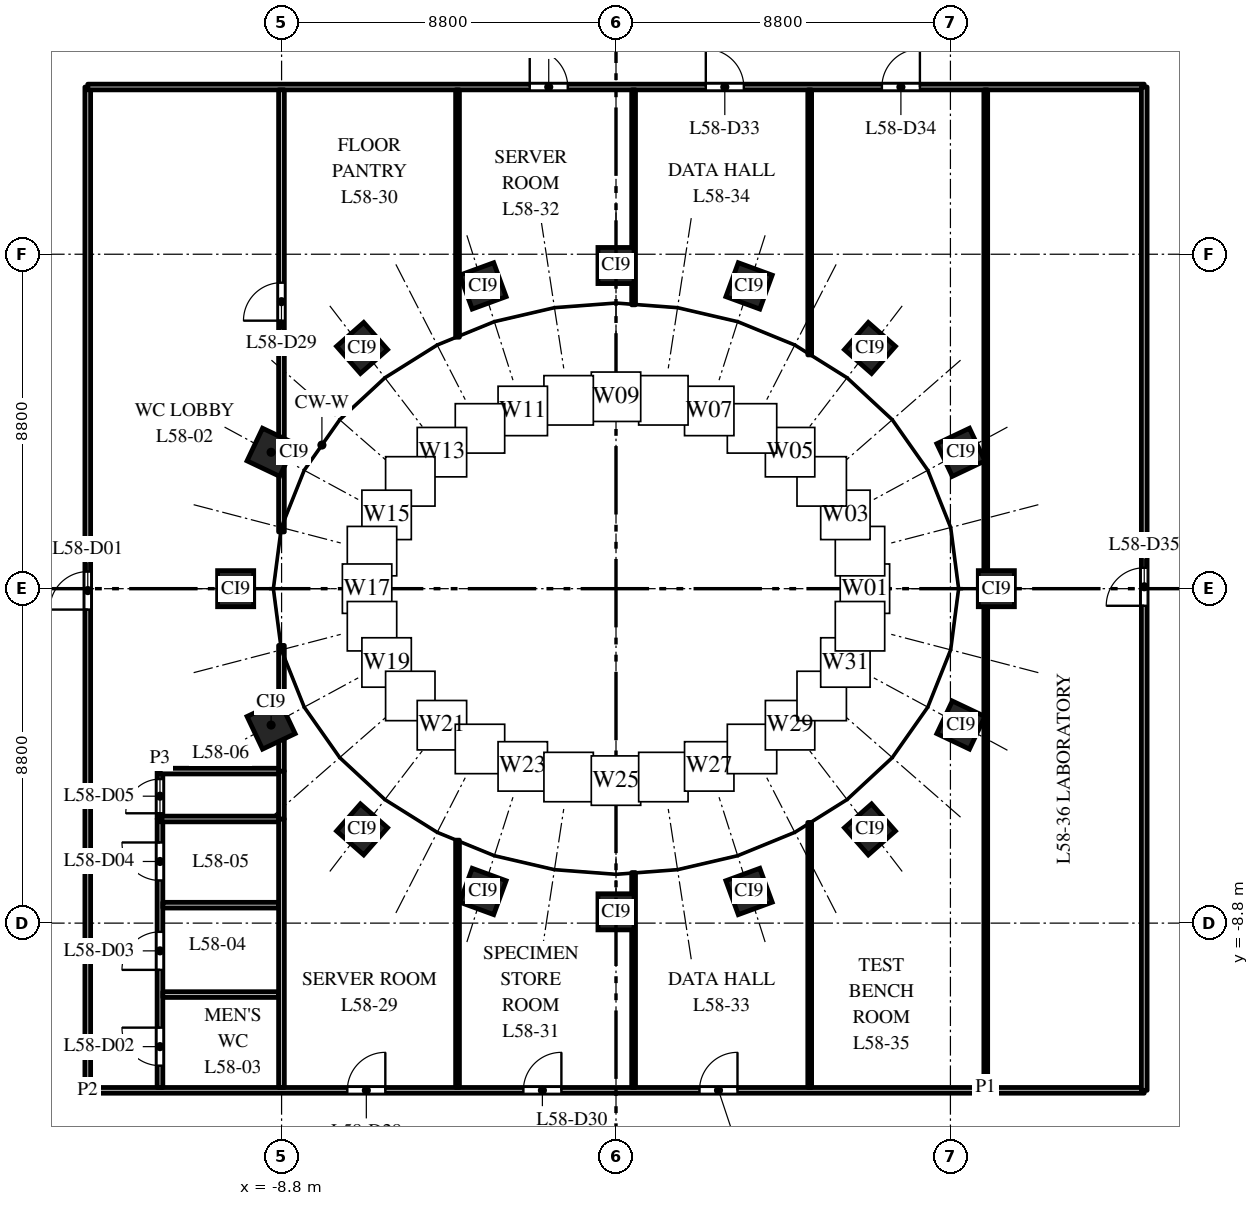
"""IFC4 building model, lengths in metres.
Left out: names, types, materials, properties, quantities, classifications, styles, units other than length and angle.
Written with IfcOpenShell. Run it as: python <this file> out.ifc"""

import sys

from ifc_helpers import new_model, si_unit, direction, frame, frame_2d, origin, origin_2d, place, context, subcontext, project, spatial, rectangle, extrude, element, fill, save


model = new_model("IFC4")
c1 = context("Model", 3, precision=1e-05, world=origin(), true_north=direction((0.0, 1.0)))
c2 = subcontext(c1, "Body", "Model", "MODEL_VIEW")
j1 = project(units=[si_unit("LENGTHUNIT", "METRE"), si_unit("PLANEANGLEUNIT", "RADIAN")], contexts=[c1])
p1 = place(None, origin())
s1 = spatial("IfcSite", under=j1, at=p1, CompositionType="ELEMENT")
p2 = place(p1, origin())
s2 = spatial("IfcBuilding", under=s1, at=p2, CompositionType="ELEMENT")
p3 = place(p2, frame((0.0, 0.0, 273.5)))
s3 = spatial("IfcBuildingStorey", under=s2, at=p3, CompositionType="ELEMENT", Elevation=273.5)
for number, where, z_axis, x_axis in (
    (1, (10.008, 0.0, 0.0), (0.0, 0.0, 1.0), (0.0, 1.0, 0.0)),
    (2, (9.076, 3.588, 0.0), (0.0, 0.0, 1.0), (-0.429, 0.903, 0.0)),
    (3, (6.682, 6.334, 0.0), (0.0, 0.0, 1.0), (-0.751, 0.66, 0.0)),
    (4, (3.501, 7.967, 0.0), (0.0, 0.0, 1.0), (-0.939, 0.344, 0.0)),
    (5, (0.0, 8.503, 0.0), (0.0, 0.0, 1.0), (-1.0, 0.0, 0.0)),
    (6, (-3.501, 7.967, 0.0), (0.0, 0.0, 1.0), (-0.939, -0.344, 0.0)),
    (7, (-6.682, 6.334, 0.0), (0.0, 0.0, 1.0), (-0.751, -0.66, 0.0)),
    (8, (-9.076, 3.588, 0.0), (0.0, 0.0, 1.0), (-0.429, -0.903, 0.0)),
    (9, (-10.008, 0.0, 0.0), (0.0, 0.0, 1.0), (0.0, -1.0, 0.0)),
    (10, (-9.076, -3.588, 0.0), (0.0, 0.0, 1.0), (0.429, -0.903, 0.0)),
    (11, (-6.682, -6.334, 0.0), (0.0, 0.0, 1.0), (0.751, -0.66, 0.0)),
    (12, (-3.501, -7.967, 0.0), (0.0, 0.0, 1.0), (0.939, -0.344, 0.0)),
    (13, (0.0, -8.503, 0.0), (0.0, 0.0, 1.0), (1.0, 0.0, 0.0)),
    (14, (3.501, -7.967, 0.0), (0.0, 0.0, 1.0), (0.939, 0.344, 0.0)),
    (15, (6.682, -6.334, 0.0), (0.0, 0.0, 1.0), (0.751, 0.66, 0.0)),
    (16, (9.076, -3.588, 0.0), (0.0, 0.0, 1.0), (0.429, 0.903, 0.0)),
):
    element("IfcColumn", number, at=place(p3, frame(where, z_axis=z_axis, x_axis=x_axis)), inside=s3, PredefinedType="COLUMN", context=c2, shape_type="SweptSolid", body=[
        extrude(rectangle(XDim=0.95, YDim=0.95, at=origin_2d()), origin(), (0.0, 0.0, 1.0), 4.0),
    ])
p4 = place(p3, frame((-13.9, -13.2, 0.0), z_axis=(0.0, 0.0, 1.0), x_axis=(0.0, 1.0, 0.0)))
e17 = element("IfcWall", 17, at=p4, inside=s3, PredefinedType="PARTITIONING", context=c2, shape_type="SweptSolid", body=[
    extrude(rectangle(XDim=26.4, YDim=0.15, at=frame_2d((13.2, 0.0))), origin(), (0.0, 0.0, 1.0), 2.75),
])
p5 = place(p4, frame((12.65, 0.0, 0.0)))
e18 = element("IfcOpeningElement", 18, at=p5, cuts=e17, PredefinedType="OPENING", context=c2, shape_type="SweptSolid", body=[
    extrude(rectangle(XDim=1.0, YDim=2.1, at=frame_2d((0.5, 1.05))), frame((0.0, 0.085, 0.0), z_axis=(0.0, -1.0, 0.0), x_axis=(1.0, 0.0, 0.0)), (0.0, 0.0, 1.0), 0.17),
])
p6 = place(p3, frame((-13.9, -13.2, 0.0), z_axis=(0.0, 0.0, 1.0), x_axis=(1.0, 0.0, 0.0)))
e19 = element("IfcWall", 19, at=p6, inside=s3, PredefinedType="PARTITIONING", context=c2, shape_type="SweptSolid", body=[
    extrude(rectangle(XDim=27.8, YDim=0.15, at=frame_2d((13.9, 0.0))), origin(), (0.0, 0.0, 1.0), 2.85),
])
p7 = place(p6, frame((6.83, 0.0, 0.0)))
e20 = element("IfcOpeningElement", 20, at=p7, cuts=e19, PredefinedType="OPENING", context=c2, shape_type="SweptSolid", body=[
    extrude(rectangle(XDim=1.0, YDim=2.1, at=frame_2d((0.5, 1.05))), frame((0.0, 0.085, 0.0), z_axis=(0.0, -1.0, 0.0), x_axis=(1.0, 0.0, 0.0)), (0.0, 0.0, 1.0), 0.17),
])
p8 = place(p6, frame((11.463, 0.0, 0.0)))
e21 = element("IfcOpeningElement", 21, at=p8, cuts=e19, PredefinedType="OPENING", context=c2, shape_type="SweptSolid", body=[
    extrude(rectangle(XDim=1.0, YDim=2.1, at=frame_2d((0.5, 1.05))), frame((0.0, 0.085, 0.0), z_axis=(0.0, -1.0, 0.0), x_axis=(1.0, 0.0, 0.0)), (0.0, 0.0, 1.0), 0.17),
])
p9 = place(p6, frame((16.097, 0.0, 0.0)))
e22 = element("IfcOpeningElement", 22, at=p9, cuts=e19, PredefinedType="OPENING", context=c2, shape_type="SweptSolid", body=[
    extrude(rectangle(XDim=1.0, YDim=2.1, at=frame_2d((0.5, 1.05))), frame((0.0, 0.085, 0.0), z_axis=(0.0, -1.0, 0.0), x_axis=(1.0, 0.0, 0.0)), (0.0, 0.0, 1.0), 0.17),
])
p10 = place(p3, frame((-13.9, 13.2, 0.0), z_axis=(0.0, 0.0, 1.0), x_axis=(1.0, 0.0, 0.0)))
e23 = element("IfcWall", 23, at=p10, inside=s3, PredefinedType="PARTITIONING", context=c2, shape_type="SweptSolid", body=[
    extrude(rectangle(XDim=27.8, YDim=0.15, at=frame_2d((13.9, 0.0))), origin(), (0.0, 0.0, 1.0), 2.85),
])
p11 = place(p10, frame((11.63, 0.0, 0.0)))
e24 = element("IfcOpeningElement", 24, at=p11, cuts=e23, PredefinedType="OPENING", context=c2, shape_type="SweptSolid", body=[
    extrude(rectangle(XDim=1.0, YDim=2.1, at=frame_2d((0.5, 1.05))), frame((0.0, 0.085, 0.0), z_axis=(0.0, -1.0, 0.0), x_axis=(1.0, 0.0, 0.0)), (0.0, 0.0, 1.0), 0.17),
])
p12 = place(p10, frame((16.263, 0.0, 0.0)))
e25 = element("IfcOpeningElement", 25, at=p12, cuts=e23, PredefinedType="OPENING", context=c2, shape_type="SweptSolid", body=[
    extrude(rectangle(XDim=1.0, YDim=2.1, at=frame_2d((0.5, 1.05))), frame((0.0, 0.085, 0.0), z_axis=(0.0, -1.0, 0.0), x_axis=(1.0, 0.0, 0.0)), (0.0, 0.0, 1.0), 0.17),
])
p13 = place(p10, frame((20.897, 0.0, 0.0)))
e26 = element("IfcOpeningElement", 26, at=p13, cuts=e23, PredefinedType="OPENING", context=c2, shape_type="SweptSolid", body=[
    extrude(rectangle(XDim=1.0, YDim=2.1, at=frame_2d((0.5, 1.05))), frame((0.0, 0.085, 0.0), z_axis=(0.0, -1.0, 0.0), x_axis=(1.0, 0.0, 0.0)), (0.0, 0.0, 1.0), 0.17),
])
p14 = place(p3, frame((-12.0, -13.125, 0.0), z_axis=(0.0, 0.0, 1.0), x_axis=(0.0, 1.0, 0.0)))
e27 = element("IfcWall", 27, at=p14, inside=s3, PredefinedType="PARTITIONING", context=c2, shape_type="SweptSolid", body=[
    extrude(rectangle(XDim=7.065, YDim=0.15, at=frame_2d((3.532, 0.0))), origin(), (0.0, 0.0, 1.0), 2.75),
])
p15 = place(p14, frame((0.575, 0.0, 0.0)))
e28 = element("IfcOpeningElement", 28, at=p15, cuts=e27, PredefinedType="OPENING", context=c2, shape_type="SweptSolid", body=[
    extrude(rectangle(XDim=1.0, YDim=2.1, at=frame_2d((0.5, 1.05))), frame((0.0, 0.085, 0.0), z_axis=(0.0, -1.0, 0.0), x_axis=(1.0, 0.0, 0.0)), (0.0, 0.0, 1.0), 0.17),
])
p16 = place(p14, frame((3.095, 0.0, 0.0)))
e29 = element("IfcOpeningElement", 29, at=p16, cuts=e27, PredefinedType="OPENING", context=c2, shape_type="SweptSolid", body=[
    extrude(rectangle(XDim=1.0, YDim=2.1, at=frame_2d((0.5, 1.05))), frame((0.0, 0.085, 0.0), z_axis=(0.0, -1.0, 0.0), x_axis=(1.0, 0.0, 0.0)), (0.0, 0.0, 1.0), 0.17),
])
p17 = place(p14, frame((5.447, 0.0, 0.0)))
e30 = element("IfcOpeningElement", 30, at=p17, cuts=e27, PredefinedType="OPENING", context=c2, shape_type="SweptSolid", body=[
    extrude(rectangle(XDim=1.0, YDim=2.1, at=frame_2d((0.5, 1.05))), frame((0.0, 0.085, 0.0), z_axis=(0.0, -1.0, 0.0), x_axis=(1.0, 0.0, 0.0)), (0.0, 0.0, 1.0), 0.17),
])
p18 = place(p3, frame((-11.925, -10.68, 0.0), z_axis=(0.0, 0.0, 1.0), x_axis=(1.0, 0.0, 0.0)))
e31 = element("IfcWall", 31, at=p18, inside=s3, PredefinedType="PARTITIONING", context=c2, shape_type="SweptSolid", body=[
    extrude(rectangle(XDim=3.047, YDim=0.15, at=frame_2d((1.523, 0.0))), origin(), (0.0, 0.0, 1.0), 3.7),
])
p19 = place(p3, frame((-11.925, -8.328, 0.0), z_axis=(0.0, 0.0, 1.0), x_axis=(1.0, 0.0, 0.0)))
e32 = element("IfcWall", 32, at=p19, inside=s3, PredefinedType="PARTITIONING", context=c2, shape_type="SweptSolid", body=[
    extrude(rectangle(XDim=3.047, YDim=0.15, at=frame_2d((1.523, 0.0))), origin(), (0.0, 0.0, 1.0), 2.75),
])
p20 = place(p3, frame((-12.0, -6.06, 0.0), z_axis=(0.0, 0.0, 1.0), x_axis=(0.0, 1.0, 0.0)))
e33 = element("IfcWall", 33, at=p20, inside=s3, PredefinedType="PARTITIONING", context=c2, shape_type="SweptSolid", body=[
    extrude(rectangle(XDim=1.26, YDim=0.15, at=frame_2d((0.63, 0.0))), origin(), (0.0, 0.0, 1.0), 3.7),
])
p21 = place(p20, frame((0.15, 0.0, 0.0)))
e34 = element("IfcOpeningElement", 34, at=p21, cuts=e33, PredefinedType="OPENING", context=c2, shape_type="SweptSolid", body=[
    extrude(rectangle(XDim=0.9, YDim=2.1, at=frame_2d((0.45, 1.05))), frame((0.0, 0.085, 0.0), z_axis=(0.0, -1.0, 0.0), x_axis=(1.0, 0.0, 0.0)), (0.0, 0.0, 1.0), 0.17),
])
for number, where, z_axis, x_axis in (
    (35, (-12.0, -6.06, 0.0), (0.0, 0.0, 1.0), (1.0, 0.0, 0.0)),
    (36, (-12.0, -4.8, 0.0), (0.0, 0.0, 1.0), (1.0, 0.0, 0.0)),
):
    element("IfcWall", number, at=place(p3, frame(where, z_axis=z_axis, x_axis=x_axis)), inside=s3, PredefinedType="PARTITIONING", context=c2, shape_type="SweptSolid", body=[
        extrude(rectangle(XDim=3.197, YDim=0.15, at=frame_2d((1.599, 0.0))), origin(), (0.0, 0.0, 1.0), 3.7),
    ])
p22 = place(p3, frame((-8.803, -13.125, 0.0), z_axis=(0.0, 0.0, 1.0), x_axis=(0.0, 1.0, 0.0)))
e37 = element("IfcWall", 37, at=p22, inside=s3, PredefinedType="PARTITIONING", context=c2, shape_type="SweptSolid", body=[
    extrude(rectangle(XDim=7.065, YDim=0.15, at=frame_2d((3.532, 0.0))), origin(), (0.0, 0.0, 1.0), 2.75),
])
p23 = place(p3, frame((-8.803, -6.06, 0.0), z_axis=(0.0, 0.0, 1.0), x_axis=(0.0, 1.0, 0.0)))
e38 = element("IfcWall", 38, at=p23, inside=s3, PredefinedType="PARTITIONING", context=c2, shape_type="SweptSolid", body=[
    extrude(rectangle(XDim=1.26, YDim=0.15, at=frame_2d((0.63, 0.0))), origin(), (0.0, 0.0, 1.0), 3.7),
])
p24 = place(p3, frame((-8.803, -4.8, 0.0), z_axis=(0.0, 0.0, 1.0), x_axis=(0.0, 1.0, 0.0)))
e39 = element("IfcWall", 39, at=p24, inside=s3, PredefinedType="PARTITIONING", context=c2, shape_type="SweptSolid", body=[
    extrude(rectangle(XDim=3.307, YDim=0.15, at=frame_2d((1.654, 0.0))), origin(), (0.0, 0.0, 1.0), 3.0),
])
p25 = place(p3, frame((-8.803, 1.493, 0.0), z_axis=(0.0, 0.0, 1.0), x_axis=(0.0, 1.0, 0.0)))
e40 = element("IfcWall", 40, at=p25, inside=s3, PredefinedType="PARTITIONING", context=c2, shape_type="SweptSolid", body=[
    extrude(rectangle(XDim=11.632, YDim=0.15, at=frame_2d((5.816, 0.0))), origin(), (0.0, 0.0, 1.0), 2.75),
])
p26 = place(p25, frame((5.559, 0.0, 0.0)))
e41 = element("IfcOpeningElement", 41, at=p26, cuts=e40, PredefinedType="OPENING", context=c2, shape_type="SweptSolid", body=[
    extrude(rectangle(XDim=1.0, YDim=2.1, at=frame_2d((0.5, 1.05))), frame((0.0, 0.085, 0.0), z_axis=(0.0, -1.0, 0.0), x_axis=(1.0, 0.0, 0.0)), (0.0, 0.0, 1.0), 0.17),
])
for number, where, z_axis, x_axis in (
    (42, (-4.17, -13.125, 0.0), (0.0, 0.0, 1.0), (0.0, 1.0, 0.0)),
    (43, (-4.17, 6.617, 0.0), (0.0, 0.0, 1.0), (0.0, 1.0, 0.0)),
):
    element("IfcWall", number, at=place(p3, frame(where, z_axis=z_axis, x_axis=x_axis)), inside=s3, PredefinedType="PARTITIONING", context=c2, shape_type="SweptSolid", body=[
        extrude(rectangle(XDim=6.508, YDim=0.1, at=frame_2d((3.254, 0.0))), origin(), (0.0, 0.0, 1.0), 2.85),
    ])
for number, where, z_axis, x_axis in (
    (44, (0.463, -13.125, 0.0), (0.0, 0.0, 1.0), (0.0, 1.0, 0.0)),
    (45, (0.463, 7.469, 0.0), (0.0, 0.0, 1.0), (0.0, 1.0, 0.0)),
):
    element("IfcWall", number, at=place(p3, frame(where, z_axis=z_axis, x_axis=x_axis)), inside=s3, PredefinedType="PARTITIONING", context=c2, shape_type="SweptSolid", body=[
        extrude(rectangle(XDim=5.656, YDim=0.1, at=frame_2d((2.828, 0.0))), origin(), (0.0, 0.0, 1.0), 3.0),
    ])
for number, where, z_axis, x_axis in (
    (46, (5.097, -13.125, 0.0), (0.0, 0.0, 1.0), (0.0, 1.0, 0.0)),
    (47, (5.097, 6.151, 0.0), (0.0, 0.0, 1.0), (0.0, 1.0, 0.0)),
):
    element("IfcWall", number, at=place(p3, frame(where, z_axis=z_axis, x_axis=x_axis)), inside=s3, PredefinedType="PARTITIONING", context=c2, shape_type="SweptSolid", body=[
        extrude(rectangle(XDim=6.974, YDim=0.1, at=frame_2d((3.487, 0.0))), origin(), (0.0, 0.0, 1.0), 2.85),
    ])
p27 = place(p3, frame((9.73, -13.125, 0.0), z_axis=(0.0, 0.0, 1.0), x_axis=(0.0, 1.0, 0.0)))
e48 = element("IfcWall", 48, at=p27, inside=s3, PredefinedType="PARTITIONING", context=c2, shape_type="SweptSolid", body=[
    extrude(rectangle(XDim=26.25, YDim=0.1, at=frame_2d((13.125, 0.0))), origin(), (0.0, 0.0, 1.0), 2.75),
])
p28 = place(p3, frame((13.9, -13.2, 0.0), z_axis=(0.0, 0.0, 1.0), x_axis=(0.0, 1.0, 0.0)))
e49 = element("IfcWall", 49, at=p28, inside=s3, PredefinedType="PARTITIONING", context=c2, shape_type="SweptSolid", body=[
    extrude(rectangle(XDim=26.4, YDim=0.15, at=frame_2d((13.2, 0.0))), origin(), (0.0, 0.0, 1.0), 2.75),
])
p29 = place(p28, frame((12.75, 0.0, 0.0)))
e50 = element("IfcOpeningElement", 50, at=p29, cuts=e49, PredefinedType="OPENING", context=c2, shape_type="SweptSolid", body=[
    extrude(rectangle(XDim=1.0, YDim=2.1, at=frame_2d((0.5, 1.05))), frame((0.0, 0.085, 0.0), z_axis=(0.0, -1.0, 0.0), x_axis=(1.0, 0.0, 0.0)), (0.0, 0.0, 1.0), 0.17),
])
p30 = place(p5, origin())
e51 = element("IfcDoor", 51, at=p30, inside=s3, OperationType="SINGLE_SWING_LEFT", PredefinedType="DOOR", context=c2, shape_type="SweptSolid", body=[
    extrude(rectangle(XDim=1.0, YDim=2.1, at=frame_2d((0.5, 1.05))), frame((0.0, 0.025, 0.0), z_axis=(0.0, -1.0, 0.0), x_axis=(1.0, 0.0, 0.0)), (0.0, 0.0, 1.0), 0.05),
])
fill(e18, e51)
p31 = place(p15, origin())
e52 = element("IfcDoor", 52, at=p31, inside=s3, OperationType="SINGLE_SWING_RIGHT", PredefinedType="DOOR", context=c2, shape_type="SweptSolid", body=[
    extrude(rectangle(XDim=1.0, YDim=2.1, at=frame_2d((0.5, 1.05))), frame((0.0, 0.025, 0.0), z_axis=(0.0, -1.0, 0.0), x_axis=(1.0, 0.0, 0.0)), (0.0, 0.0, 1.0), 0.05),
])
fill(e28, e52)
p32 = place(p16, origin())
e53 = element("IfcDoor", 53, at=p32, inside=s3, OperationType="SINGLE_SWING_LEFT", PredefinedType="DOOR", context=c2, shape_type="SweptSolid", body=[
    extrude(rectangle(XDim=1.0, YDim=2.1, at=frame_2d((0.5, 1.05))), frame((0.0, 0.025, 0.0), z_axis=(0.0, -1.0, 0.0), x_axis=(1.0, 0.0, 0.0)), (0.0, 0.0, 1.0), 0.05),
])
fill(e29, e53)
p33 = place(p17, origin())
e54 = element("IfcDoor", 54, at=p33, inside=s3, OperationType="SINGLE_SWING_RIGHT", PredefinedType="DOOR", context=c2, shape_type="SweptSolid", body=[
    extrude(rectangle(XDim=1.0, YDim=2.1, at=frame_2d((0.5, 1.05))), frame((0.0, 0.025, 0.0), z_axis=(0.0, -1.0, 0.0), x_axis=(1.0, 0.0, 0.0)), (0.0, 0.0, 1.0), 0.05),
])
fill(e30, e54)
p34 = place(p21, origin())
e55 = element("IfcDoor", 55, at=p34, inside=s3, OperationType="SINGLE_SWING_LEFT", PredefinedType="DOOR", context=c2, shape_type="SweptSolid", body=[
    extrude(rectangle(XDim=0.9, YDim=2.1, at=frame_2d((0.45, 1.05))), frame((0.0, 0.025, 0.0), z_axis=(0.0, -1.0, 0.0), x_axis=(1.0, 0.0, 0.0)), (0.0, 0.0, 1.0), 0.05),
])
fill(e34, e55)
p35 = place(p7, origin())
e56 = element("IfcDoor", 56, at=p35, inside=s3, OperationType="SINGLE_SWING_RIGHT", PredefinedType="DOOR", context=c2, shape_type="SweptSolid", body=[
    extrude(rectangle(XDim=1.0, YDim=2.1, at=frame_2d((0.5, 1.05))), frame((0.0, 0.025, 0.0), z_axis=(0.0, -1.0, 0.0), x_axis=(1.0, 0.0, 0.0)), (0.0, 0.0, 1.0), 0.05),
])
fill(e20, e56)
p36 = place(p26, origin())
e57 = element("IfcDoor", 57, at=p36, inside=s3, OperationType="SINGLE_SWING_LEFT", PredefinedType="DOOR", context=c2, shape_type="SweptSolid", body=[
    extrude(rectangle(XDim=1.0, YDim=2.1, at=frame_2d((0.5, 1.05))), frame((0.0, 0.025, 0.0), z_axis=(0.0, -1.0, 0.0), x_axis=(1.0, 0.0, 0.0)), (0.0, 0.0, 1.0), 0.05),
])
fill(e41, e57)
p37 = place(p8, origin())
e58 = element("IfcDoor", 58, at=p37, inside=s3, OperationType="SINGLE_SWING_RIGHT", PredefinedType="DOOR", context=c2, shape_type="SweptSolid", body=[
    extrude(rectangle(XDim=1.0, YDim=2.1, at=frame_2d((0.5, 1.05))), frame((0.0, 0.025, 0.0), z_axis=(0.0, -1.0, 0.0), x_axis=(1.0, 0.0, 0.0)), (0.0, 0.0, 1.0), 0.05),
])
fill(e21, e58)
p38 = place(p11, origin())
e59 = element("IfcDoor", 59, at=p38, inside=s3, OperationType="SINGLE_SWING_LEFT", PredefinedType="DOOR", context=c2, shape_type="SweptSolid", body=[
    extrude(rectangle(XDim=1.0, YDim=2.1, at=frame_2d((0.5, 1.05))), frame((0.0, 0.025, 0.0), z_axis=(0.0, -1.0, 0.0), x_axis=(1.0, 0.0, 0.0)), (0.0, 0.0, 1.0), 0.05),
])
fill(e24, e59)
p39 = place(p9, origin())
e60 = element("IfcDoor", 60, at=p39, inside=s3, OperationType="SINGLE_SWING_RIGHT", PredefinedType="DOOR", context=c2, shape_type="SweptSolid", body=[
    extrude(rectangle(XDim=1.0, YDim=2.1, at=frame_2d((0.5, 1.05))), frame((0.0, 0.025, 0.0), z_axis=(0.0, -1.0, 0.0), x_axis=(1.0, 0.0, 0.0)), (0.0, 0.0, 1.0), 0.05),
])
fill(e22, e60)
p40 = place(p12, origin())
e61 = element("IfcDoor", 61, at=p40, inside=s3, OperationType="SINGLE_SWING_LEFT", PredefinedType="DOOR", context=c2, shape_type="SweptSolid", body=[
    extrude(rectangle(XDim=1.0, YDim=2.1, at=frame_2d((0.5, 1.05))), frame((0.0, 0.025, 0.0), z_axis=(0.0, -1.0, 0.0), x_axis=(1.0, 0.0, 0.0)), (0.0, 0.0, 1.0), 0.05),
])
fill(e25, e61)
p41 = place(p13, origin())
e62 = element("IfcDoor", 62, at=p41, inside=s3, OperationType="SINGLE_SWING_RIGHT", PredefinedType="DOOR", context=c2, shape_type="SweptSolid", body=[
    extrude(rectangle(XDim=1.0, YDim=2.1, at=frame_2d((0.5, 1.05))), frame((0.0, 0.025, 0.0), z_axis=(0.0, -1.0, 0.0), x_axis=(1.0, 0.0, 0.0)), (0.0, 0.0, 1.0), 0.05),
])
fill(e26, e62)
p42 = place(p29, origin())
e63 = element("IfcDoor", 63, at=p42, inside=s3, OperationType="SINGLE_SWING_LEFT", PredefinedType="DOOR", context=c2, shape_type="SweptSolid", body=[
    extrude(rectangle(XDim=1.0, YDim=2.1, at=frame_2d((0.5, 1.05))), frame((0.0, 0.025, 0.0), z_axis=(0.0, -1.0, 0.0), x_axis=(1.0, 0.0, 0.0)), (0.0, 0.0, 1.0), 0.05),
])
fill(e50, e63)
save(model, sys.argv[1])
